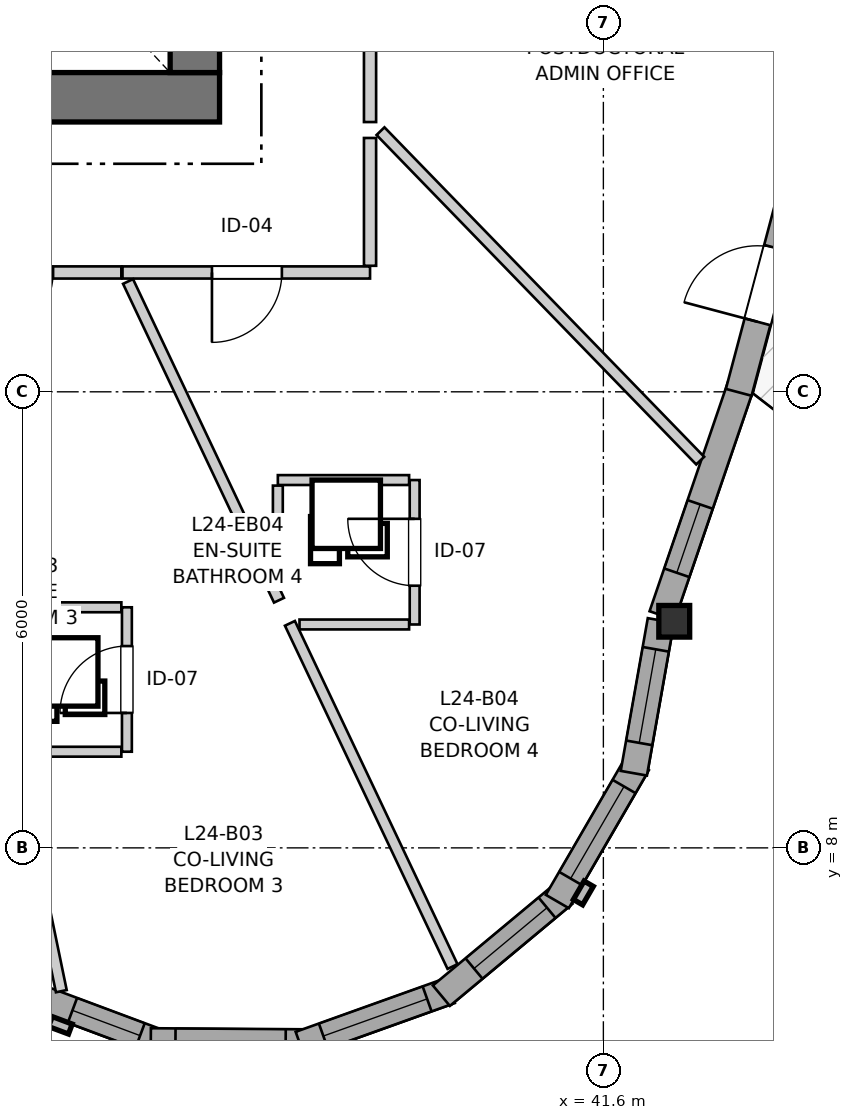
"""IFC4 building model, lengths in metres.
Left out: names, types, materials, properties, quantities, classifications, styles, units other than length and angle.
Written with IfcOpenShell. Run it as: python <this file> out.ifc"""

import sys

from ifc_helpers import new_model, si_unit, direction, frame, frame_2d, origin, origin_2d, place, context, subcontext, project, spatial, rectangle, i_section, extrude, source, transform, mapped, element, fill, save


model = new_model("IFC4")
c1 = context("Model", 3, precision=1e-05, world=origin(), true_north=direction((0.0, 1.0)))
c2 = subcontext(c1, "Body", "Model", "MODEL_VIEW")
j1 = project(units=[si_unit("LENGTHUNIT", "METRE"), si_unit("PLANEANGLEUNIT", "RADIAN")], contexts=[c1])
p1 = place(None, origin())
s1 = spatial("IfcSite", under=j1, at=p1, CompositionType="ELEMENT")
p2 = place(p1, origin())
s2 = spatial("IfcBuilding", under=s1, at=p2, CompositionType="ELEMENT")
p3 = place(p2, frame((0.0, 0.0, 83.2)))
s3 = spatial("IfcBuildingStorey", under=s2, at=p3, CompositionType="ELEMENT", Elevation=83.2)
p4 = place(p3, frame((24.15, 17.875, 0.0), z_axis=(0.0, 0.0, 1.0), x_axis=(1.0, 0.0, 0.0)))
e1 = element("IfcWall", 1, at=p4, inside=s3, PredefinedType="SHEAR", context=c2, shape_type="SweptSolid", body=[
    extrude(rectangle(XDim=12.4, YDim=0.65, at=frame_2d((6.2, 0.0))), origin(), (0.0, 0.0, 1.0), 2.935),
])
p5 = place(p3, frame((36.225, 18.2, 0.0), z_axis=(0.0, 0.0, 1.0), x_axis=(0.0, 1.0, 0.0)))
e2 = element("IfcWall", 2, at=p5, inside=s3, PredefinedType="SHEAR", context=c2, shape_type="SweptSolid", body=[
    extrude(rectangle(XDim=15.6, YDim=0.65, at=frame_2d((7.8, 0.0))), origin(), (0.0, 0.0, 1.0), 2.935),
])
p6 = place(p5, frame((4.25, 0.0, 0.0)))
e3 = element("IfcOpeningElement", 3, at=p6, cuts=e2, PredefinedType="OPENING", context=c2, shape_type="SweptSolid", body=[
    extrude(rectangle(XDim=1.1, YDim=2.15, at=frame_2d((0.55, 1.075))), frame((0.0, 0.335, 0.0), z_axis=(0.0, -1.0, 0.0), x_axis=(1.0, 0.0, 0.0)), (0.0, 0.0, 1.0), 0.67),
])
p7 = place(p5, frame((10.25, 0.0, 0.0)))
e4 = element("IfcOpeningElement", 4, at=p7, cuts=e2, PredefinedType="OPENING", context=c2, shape_type="SweptSolid", body=[
    extrude(rectangle(XDim=1.1, YDim=2.15, at=frame_2d((0.55, 1.075))), frame((0.0, 0.335, 0.0), z_axis=(0.0, -1.0, 0.0), x_axis=(1.0, 0.0, 0.0)), (0.0, 0.0, 1.0), 0.67),
])
m1 = source(origin(), c2, "Body", "SweptSolid", [
    extrude(i_section(OverallWidth=0.406, OverallDepth=0.416, WebThickness=0.027, FlangeThickness=0.044, FilletRadius=0.015, at=origin_2d()), origin(), (0.0, 0.0, 1.0), 2.935),
])
p8 = place(p3, frame((42.532, 10.981, 0.0), z_axis=(0.0, 0.0, 1.0), x_axis=(1.0, 0.0, 0.0)))
e5 = element("IfcColumn", 5, at=p8, inside=s3, PredefinedType="PILASTER", context=c2, shape_type="MappedRepresentation", body=[
    mapped(m1, transform((0.0, 0.0, 0.0), x_axis=(1.0, 0.0, 0.0), y_axis=(0.0, 1.0, 0.0), z_axis=(0.0, 0.0, 1.0), scale=1.0)),
])
p9 = place(p3, frame((34.059, 6.07, 0.0), z_axis=(0.0, 0.0, 1.0), x_axis=(0.936803747811, -0.349855310219, 0.0)))
e6 = element("IfcWall", 6, at=p9, inside=s3, PredefinedType="SOLIDWALL", context=c2, shape_type="SweptSolid", body=[
    extrude(rectangle(XDim=1.836, YDim=0.35, at=frame_2d((0.918, 0.0))), origin(), (0.0, 0.0, 1.0), 2.465),
])
p10 = place(p9, frame((0.593, 0.0, 0.82)))
e7 = element("IfcOpeningElement", 7, at=p10, cuts=e6, PredefinedType="OPENING", context=c2, shape_type="SweptSolid", body=[
    extrude(rectangle(XDim=0.95, YDim=1.35, at=frame_2d((0.475, 0.675))), frame((0.0, 0.185, 0.0), z_axis=(0.0, -1.0, 0.0), x_axis=(1.0, 0.0, 0.0)), (0.0, 0.0, 1.0), 0.37),
])
p11 = place(p3, frame((35.646, 5.452, 0.0), z_axis=(0.0, 0.0, 1.0), x_axis=(0.999976451414, -0.006862697526, 0.0)))
e8 = element("IfcWall", 8, at=p11, inside=s3, PredefinedType="SOLIDWALL", context=c2, shape_type="SweptSolid", body=[
    extrude(rectangle(XDim=2.099, YDim=0.35, at=frame_2d((1.049, 0.0))), origin(), (0.0, 0.0, 1.0), 2.465),
])
p12 = place(p11, frame((0.324, 0.0, 0.82)))
e9 = element("IfcOpeningElement", 9, at=p12, cuts=e8, PredefinedType="OPENING", context=c2, shape_type="SweptSolid", body=[
    extrude(rectangle(XDim=1.45, YDim=1.25, at=frame_2d((0.725, 0.625))), frame((0.0, 0.185, 0.0), z_axis=(0.0, -1.0, 0.0), x_axis=(1.0, 0.0, 0.0)), (0.0, 0.0, 1.0), 0.37),
])
p13 = place(p3, frame((37.61, 5.415, 0.0), z_axis=(0.0, 0.0, 1.0), x_axis=(0.941473186867, 0.33708787936, 0.0)))
e10 = element("IfcWall", 10, at=p13, inside=s3, PredefinedType="SOLIDWALL", context=c2, shape_type="SweptSolid", body=[
    extrude(rectangle(XDim=2.099, YDim=0.35, at=frame_2d((1.049, 0.0))), origin(), (0.0, 0.0, 1.0), 2.465),
])
p14 = place(p13, frame((0.324, 0.0, 0.82)))
e11 = element("IfcOpeningElement", 11, at=p14, cuts=e10, PredefinedType="OPENING", context=c2, shape_type="SweptSolid", body=[
    extrude(rectangle(XDim=1.45, YDim=1.25, at=frame_2d((0.725, 0.625))), frame((0.0, 0.185, 0.0), z_axis=(0.0, -1.0, 0.0), x_axis=(1.0, 0.0, 0.0)), (0.0, 0.0, 1.0), 0.37),
])
p15 = place(p3, frame((39.469, 6.055, 0.0), z_axis=(0.0, 0.0, 1.0), x_axis=(0.768497696041, 0.639852554249, 0.0)))
e12 = element("IfcWall", 12, at=p15, inside=s3, PredefinedType="SOLIDWALL", context=c2, shape_type="SweptSolid", body=[
    extrude(rectangle(XDim=2.099, YDim=0.35, at=frame_2d((1.049, 0.0))), origin(), (0.0, 0.0, 1.0), 2.465),
])
p16 = place(p15, frame((0.559, 0.0, 0.82)))
e13 = element("IfcOpeningElement", 13, at=p16, cuts=e12, PredefinedType="OPENING", context=c2, shape_type="SweptSolid", body=[
    extrude(rectangle(XDim=1.25, YDim=1.35, at=frame_2d((0.625, 0.675))), frame((0.0, 0.185, 0.0), z_axis=(0.0, -1.0, 0.0), x_axis=(1.0, 0.0, 0.0)), (0.0, 0.0, 1.0), 0.37),
])
p17 = place(p3, frame((40.994, 7.294, 0.0), z_axis=(0.0, 0.0, 1.0), x_axis=(0.501902596059, 0.864924149315, 0.0)))
e14 = element("IfcWall", 14, at=p17, inside=s3, PredefinedType="SOLIDWALL", context=c2, shape_type="SweptSolid", body=[
    extrude(rectangle(XDim=2.099, YDim=0.35, at=frame_2d((1.049, 0.0))), origin(), (0.0, 0.0, 1.0), 2.465),
])
p18 = place(p17, frame((0.35, 0.0, 0.82)))
e15 = element("IfcOpeningElement", 15, at=p18, cuts=e14, PredefinedType="OPENING", context=c2, shape_type="SweptSolid", body=[
    extrude(rectangle(XDim=1.4, YDim=1.35, at=frame_2d((0.7, 0.675))), frame((0.0, 0.185, 0.0), z_axis=(0.0, -1.0, 0.0), x_axis=(1.0, 0.0, 0.0)), (0.0, 0.0, 1.0), 0.37),
])
p19 = place(p3, frame((42.001, 8.982, 0.0), z_axis=(0.0, 0.0, 1.0), x_axis=(0.174419977077, 0.984671352075, 0.0)))
e16 = element("IfcWall", 16, at=p19, inside=s3, PredefinedType="SOLIDWALL", context=c2, shape_type="SweptSolid", body=[
    extrude(rectangle(XDim=2.041, YDim=0.35, at=frame_2d((1.021, 0.0))), origin(), (0.0, 0.0, 1.0), 2.465),
])
p20 = place(p19, frame((0.406, 0.0, 0.82)))
e17 = element("IfcOpeningElement", 17, at=p20, cuts=e16, PredefinedType="OPENING", context=c2, shape_type="SweptSolid", body=[
    extrude(rectangle(XDim=1.25, YDim=1.35, at=frame_2d((0.625, 0.675))), frame((0.0, 0.185, 0.0), z_axis=(0.0, -1.0, 0.0), x_axis=(1.0, 0.0, 0.0)), (0.0, 0.0, 1.0), 0.37),
])
p21 = place(p3, frame((42.373, 11.057, 0.0), z_axis=(0.0, 0.0, 1.0), x_axis=(0.323628226775, 0.946184321808, 0.0)))
e18 = element("IfcWall", 18, at=p21, inside=s3, PredefinedType="SOLIDWALL", context=c2, shape_type="SweptSolid", body=[
    extrude(rectangle(XDim=3.193, YDim=0.35, at=frame_2d((1.596, 0.0))), origin(), (0.0, 0.0, 1.0), 2.465),
])
p22 = place(p21, frame((0.595, 0.0, 0.82)))
e19 = element("IfcOpeningElement", 19, at=p22, cuts=e18, PredefinedType="OPENING", context=c2, shape_type="SweptSolid", body=[
    extrude(rectangle(XDim=0.95, YDim=1.35, at=frame_2d((0.475, 0.675))), frame((0.0, 0.185, 0.0), z_axis=(0.0, -1.0, 0.0), x_axis=(1.0, 0.0, 0.0)), (0.0, 0.0, 1.0), 0.37),
])
p23 = place(p3, frame((43.381, 13.993, 0.0), z_axis=(0.0, 0.0, 1.0), x_axis=(0.257079998736, 0.966390125286, 0.0)))
e20 = element("IfcWall", 20, at=p23, inside=s3, PredefinedType="SOLIDWALL", context=c2, shape_type="SweptSolid", body=[
    extrude(rectangle(XDim=2.921, YDim=0.35, at=frame_2d((1.46, 0.0))), origin(), (0.0, 0.0, 1.0), 2.465),
])
p24 = place(p23, frame((0.961, 0.0, 0.0)))
e21 = element("IfcOpeningElement", 21, at=p24, cuts=e20, PredefinedType="OPENING", context=c2, shape_type="SweptSolid", body=[
    extrude(rectangle(XDim=1.0, YDim=2.1, at=frame_2d((0.5, 1.05))), frame((0.0, 0.185, 0.0), z_axis=(0.0, -1.0, 0.0), x_axis=(1.0, 0.0, 0.0)), (0.0, 0.0, 1.0), 0.37),
])
p25 = place(p3, frame((38.53, 23.392, 0.0), z_axis=(0.0, 0.0, 1.0), x_axis=(0.0, -1.0, 0.0)))
e22 = element("IfcWall", 22, at=p25, inside=s3, PredefinedType="PARTITIONING", context=c2, shape_type="SweptSolid", body=[
    extrude(rectangle(XDim=5.843, YDim=0.16, at=frame_2d((2.921, 0.0))), origin(), (0.0, 0.0, 1.0), 2.935),
])
p26 = place(p25, frame((2.438, 0.0, 0.0)))
e23 = element("IfcOpeningElement", 23, at=p26, cuts=e22, PredefinedType="OPENING", context=c2, shape_type="SweptSolid", body=[
    extrude(rectangle(XDim=0.96, YDim=2.1, at=frame_2d((0.48, 1.05))), frame((0.0, 0.09, 0.0), z_axis=(0.0, -1.0, 0.0), x_axis=(1.0, 0.0, 0.0)), (0.0, 0.0, 1.0), 0.18),
])
p27 = place(p3, frame((38.53, 15.57, 0.0), z_axis=(0.0, 0.0, 1.0), x_axis=(-1.0, 0.0, 0.0)))
e24 = element("IfcWall", 24, at=p27, inside=s3, PredefinedType="PARTITIONING", context=c2, shape_type="SweptSolid", body=[
    extrude(rectangle(XDim=3.257, YDim=0.16, at=frame_2d((1.628, 0.0))), origin(), (0.0, 0.0, 1.0), 2.935),
])
p28 = place(p27, frame((1.16, 0.0, 0.0)))
e25 = element("IfcOpeningElement", 25, at=p28, cuts=e24, PredefinedType="OPENING", context=c2, shape_type="SweptSolid", body=[
    extrude(rectangle(XDim=0.92, YDim=2.1, at=frame_2d((0.46, 1.05))), frame((0.0, 0.09, 0.0), z_axis=(0.0, -1.0, 0.0), x_axis=(1.0, 0.0, 0.0)), (0.0, 0.0, 1.0), 0.18),
])
p29 = place(p3, frame((35.258, 15.57, 0.0), z_axis=(0.0, 0.0, 1.0), x_axis=(-1.0, 0.0, 0.0)))
e26 = element("IfcWall", 26, at=p29, inside=s3, PredefinedType="PARTITIONING", context=c2, shape_type="SweptSolid", body=[
    extrude(rectangle(XDim=2.718, YDim=0.16, at=frame_2d((1.359, 0.0))), origin(), (0.0, 0.0, 1.0), 2.935),
])
p30 = place(p29, frame((0.898, 0.0, 0.0)))
e27 = element("IfcOpeningElement", 27, at=p30, cuts=e26, PredefinedType="OPENING", context=c2, shape_type="SweptSolid", body=[
    extrude(rectangle(XDim=0.92, YDim=2.1, at=frame_2d((0.46, 1.05))), frame((0.0, 0.09, 0.0), z_axis=(0.0, -1.0, 0.0), x_axis=(1.0, 0.0, 0.0)), (0.0, 0.0, 1.0), 0.18),
])
p31 = place(p3, frame((39.117, 10.939, 0.0), z_axis=(0.0, 0.0, 1.0), x_axis=(0.0, 1.0, 0.0)))
e28 = element("IfcWall", 28, at=p31, inside=s3, PredefinedType="PARTITIONING", context=c2, shape_type="SweptSolid", body=[
    extrude(rectangle(XDim=1.9, YDim=0.13, at=frame_2d((0.95, 0.0))), origin(), (0.0, 0.0, 1.0), 2.935),
])
p32 = place(p31, frame((0.51, 0.0, 0.0)))
e29 = element("IfcOpeningElement", 29, at=p32, cuts=e28, PredefinedType="OPENING", context=c2, shape_type="SweptSolid", body=[
    extrude(rectangle(XDim=0.88, YDim=2.05, at=frame_2d((0.44, 1.025))), frame((0.0, 0.075, 0.0), z_axis=(0.0, -1.0, 0.0), x_axis=(1.0, 0.0, 0.0)), (0.0, 0.0, 1.0), 0.15),
])
p33 = place(p3, frame((35.331, 9.265, 0.0), z_axis=(0.0, 0.0, 1.0), x_axis=(0.0, 1.0, 0.0)))
e30 = element("IfcWall", 30, at=p33, inside=s3, PredefinedType="PARTITIONING", context=c2, shape_type="SweptSolid", body=[
    extrude(rectangle(XDim=1.9, YDim=0.13, at=frame_2d((0.95, 0.0))), origin(), (0.0, 0.0, 1.0), 2.935),
])
p34 = place(p33, frame((0.51, 0.0, 0.0)))
e31 = element("IfcOpeningElement", 31, at=p34, cuts=e30, PredefinedType="OPENING", context=c2, shape_type="SweptSolid", body=[
    extrude(rectangle(XDim=0.88, YDim=2.05, at=frame_2d((0.44, 1.025))), frame((0.0, 0.075, 0.0), z_axis=(0.0, -1.0, 0.0), x_axis=(1.0, 0.0, 0.0)), (0.0, 0.0, 1.0), 0.15),
])
p35 = place(p3, frame((38.667, 17.429, 0.0), z_axis=(0.0, 0.0, 1.0), x_axis=(0.696417222112, -0.717637131666, 0.0)))
e32 = element("IfcWall", 32, at=p35, inside=s3, PredefinedType="PARTITIONING", context=c2, shape_type="SweptSolid", body=[
    extrude(rectangle(XDim=6.04, YDim=0.145, at=frame_2d((3.02, 0.0))), origin(), (0.0, 0.0, 1.0), 2.935),
])
p36 = place(p3, frame((37.476, 10.954, 0.0), z_axis=(0.0, 0.0, 1.0), x_axis=(0.428094746621, -0.903733859007, 0.0)))
e33 = element("IfcWall", 33, at=p36, inside=s3, PredefinedType="PARTITIONING", context=c2, shape_type="SweptSolid", body=[
    extrude(rectangle(XDim=4.996, YDim=0.145, at=frame_2d((2.498, 0.0))), origin(), (0.0, 0.0, 1.0), 2.935),
])
p37 = place(p3, frame((35.346, 15.452, 0.0), z_axis=(0.0, 0.0, 1.0), x_axis=(0.428023015228, -0.903767834366, 0.0)))
e34 = element("IfcWall", 34, at=p37, inside=s3, PredefinedType="PARTITIONING", context=c2, shape_type="SweptSolid", body=[
    extrude(rectangle(XDim=4.64, YDim=0.145, at=frame_2d((2.32, 0.0))), origin(), (0.0, 0.0, 1.0), 2.935),
])
p38 = place(p3, frame((33.813, 9.28, 0.0), z_axis=(0.0, 0.0, 1.0), x_axis=(0.202648062782, -0.979251633979, 0.0)))
e35 = element("IfcWall", 35, at=p38, inside=s3, PredefinedType="PARTITIONING", context=c2, shape_type="SweptSolid", body=[
    extrude(rectangle(XDim=3.232, YDim=0.145, at=frame_2d((1.616, 0.0))), origin(), (0.0, 0.0, 1.0), 2.935),
])
p39 = place(p3, frame((38.53, 15.658, 0.0), z_axis=(0.0, 0.0, 1.0), x_axis=(0.0, 1.0, 0.0)))
e36 = element("IfcWall", 36, at=p39, inside=s3, PredefinedType="PARTITIONING", context=c2, shape_type="SweptSolid", body=[
    extrude(rectangle(XDim=1.682, YDim=0.16, at=frame_2d((0.841, 0.0))), origin(), (0.0, 0.0, 1.0), 2.935),
])
p40 = place(p3, frame((33.626, 11.165, 0.0), z_axis=(0.0, 0.0, 1.0), x_axis=(1.0, 0.0, 0.0)))
e37 = element("IfcWall", 37, at=p40, inside=s3, PredefinedType="PARTITIONING", context=c2, shape_type="SweptSolid", body=[
    extrude(rectangle(XDim=1.632, YDim=0.13, at=frame_2d((0.816, 0.0))), origin(), (0.0, 0.0, 1.0), 2.935),
])
p41 = place(p3, frame((37.317, 12.839, 0.0), z_axis=(0.0, 0.0, 1.0), x_axis=(1.0, 0.0, 0.0)))
e38 = element("IfcWall", 38, at=p41, inside=s3, PredefinedType="PARTITIONING", context=c2, shape_type="SweptSolid", body=[
    extrude(rectangle(XDim=1.727, YDim=0.13, at=frame_2d((0.864, 0.0))), origin(), (0.0, 0.0, 1.0), 2.935),
])
p42 = place(p3, frame((37.602, 10.939, 0.0), z_axis=(0.0, 0.0, 1.0), x_axis=(1.0, 0.0, 0.0)))
e39 = element("IfcWall", 39, at=p42, inside=s3, PredefinedType="PARTITIONING", context=c2, shape_type="SweptSolid", body=[
    extrude(rectangle(XDim=1.442, YDim=0.13, at=frame_2d((0.721, 0.0))), origin(), (0.0, 0.0, 1.0), 2.935),
])
p43 = place(p3, frame((37.317, 11.53, 0.0), z_axis=(0.0, 0.0, 1.0), x_axis=(0.0, 1.0, 0.0)))
e40 = element("IfcWall", 40, at=p43, inside=s3, PredefinedType="PARTITIONING", context=c2, shape_type="SweptSolid", body=[
    extrude(rectangle(XDim=1.236, YDim=0.13, at=frame_2d((0.618, 0.0))), origin(), (0.0, 0.0, 1.0), 2.935),
])
p44 = place(p3, frame((33.912, 9.265, 0.0), z_axis=(0.0, 0.0, 1.0), x_axis=(1.0, 0.0, 0.0)))
e41 = element("IfcWall", 41, at=p44, inside=s3, PredefinedType="PARTITIONING", context=c2, shape_type="SweptSolid", body=[
    extrude(rectangle(XDim=1.346, YDim=0.13, at=frame_2d((0.673, 0.0))), origin(), (0.0, 0.0, 1.0), 2.935),
])
m2 = source(origin(), c2, "Body", "SweptSolid", [
    extrude(rectangle(XDim=0.95, YDim=1.35, at=frame_2d((0.475, 0.675))), frame((0.0, 0.03, 0.0), z_axis=(0.0, -1.0, 0.0), x_axis=(1.0, 0.0, 0.0)), (0.0, 0.0, 1.0), 0.06),
])
p45 = place(p10, origin())
e42 = element("IfcWindow", 42, at=p45, inside=s3, PartitioningType="SINGLE_PANEL", PredefinedType="WINDOW", context=c2, shape_type="MappedRepresentation", body=[
    mapped(m2, transform((0.0, 0.0, 0.0), x_axis=(1.0, 0.0, 0.0), y_axis=(0.0, 1.0, 0.0), z_axis=(0.0, 0.0, 1.0), scale=1.0)),
])
fill(e7, e42)
m3 = source(origin(), c2, "Body", "SweptSolid", [
    extrude(rectangle(XDim=1.45, YDim=1.25, at=frame_2d((0.725, 0.625))), frame((0.0, 0.03, 0.0), z_axis=(0.0, -1.0, 0.0), x_axis=(1.0, 0.0, 0.0)), (0.0, 0.0, 1.0), 0.06),
])
p46 = place(p12, origin())
e43 = element("IfcWindow", 43, at=p46, inside=s3, PartitioningType="SINGLE_PANEL", PredefinedType="WINDOW", context=c2, shape_type="MappedRepresentation", body=[
    mapped(m3, transform((0.0, 0.0, 0.0), x_axis=(1.0, 0.0, 0.0), y_axis=(0.0, 1.0, 0.0), z_axis=(0.0, 0.0, 1.0), scale=1.0)),
])
fill(e9, e43)
p47 = place(p14, origin())
e44 = element("IfcWindow", 44, at=p47, inside=s3, PartitioningType="SINGLE_PANEL", PredefinedType="WINDOW", context=c2, shape_type="MappedRepresentation", body=[
    mapped(m3, transform((0.0, 0.0, 0.0), x_axis=(1.0, 0.0, 0.0), y_axis=(0.0, 1.0, 0.0), z_axis=(0.0, 0.0, 1.0), scale=1.0)),
])
fill(e11, e44)
m4 = source(origin(), c2, "Body", "SweptSolid", [
    extrude(rectangle(XDim=1.25, YDim=1.35, at=frame_2d((0.625, 0.675))), frame((0.0, 0.03, 0.0), z_axis=(0.0, -1.0, 0.0), x_axis=(1.0, 0.0, 0.0)), (0.0, 0.0, 1.0), 0.06),
])
p48 = place(p16, origin())
e45 = element("IfcWindow", 45, at=p48, inside=s3, PartitioningType="SINGLE_PANEL", PredefinedType="WINDOW", context=c2, shape_type="MappedRepresentation", body=[
    mapped(m4, transform((0.0, 0.0, 0.0), x_axis=(1.0, 0.0, 0.0), y_axis=(0.0, 1.0, 0.0), z_axis=(0.0, 0.0, 1.0), scale=1.0)),
])
fill(e13, e45)
m5 = source(origin(), c2, "Body", "SweptSolid", [
    extrude(rectangle(XDim=1.4, YDim=1.35, at=frame_2d((0.7, 0.675))), frame((0.0, 0.03, 0.0), z_axis=(0.0, -1.0, 0.0), x_axis=(1.0, 0.0, 0.0)), (0.0, 0.0, 1.0), 0.06),
])
p49 = place(p18, origin())
e46 = element("IfcWindow", 46, at=p49, inside=s3, PartitioningType="SINGLE_PANEL", PredefinedType="WINDOW", context=c2, shape_type="MappedRepresentation", body=[
    mapped(m5, transform((0.0, 0.0, 0.0), x_axis=(1.0, 0.0, 0.0), y_axis=(0.0, 1.0, 0.0), z_axis=(0.0, 0.0, 1.0), scale=1.0)),
])
fill(e15, e46)
p50 = place(p20, origin())
e47 = element("IfcWindow", 47, at=p50, inside=s3, PartitioningType="SINGLE_PANEL", PredefinedType="WINDOW", context=c2, shape_type="MappedRepresentation", body=[
    mapped(m4, transform((0.0, 0.0, 0.0), x_axis=(1.0, 0.0, 0.0), y_axis=(0.0, 1.0, 0.0), z_axis=(0.0, 0.0, 1.0), scale=1.0)),
])
fill(e17, e47)
p51 = place(p22, origin())
e48 = element("IfcWindow", 48, at=p51, inside=s3, PartitioningType="SINGLE_PANEL", PredefinedType="WINDOW", context=c2, shape_type="MappedRepresentation", body=[
    mapped(m2, transform((0.0, 0.0, 0.0), x_axis=(1.0, 0.0, 0.0), y_axis=(0.0, 1.0, 0.0), z_axis=(0.0, 0.0, 1.0), scale=1.0)),
])
fill(e19, e48)
m6 = source(origin(), c2, "Body", "SweptSolid", [
    extrude(rectangle(XDim=1.0, YDim=2.1, at=frame_2d((0.5, 1.05))), frame((0.0, 0.025, 0.0), z_axis=(0.0, -1.0, 0.0), x_axis=(1.0, 0.0, 0.0)), (0.0, 0.0, 1.0), 0.05),
])
p52 = place(p24, origin())
e49 = element("IfcDoor", 49, at=p52, inside=s3, OperationType="SINGLE_SWING_LEFT", PredefinedType="DOOR", context=c2, shape_type="MappedRepresentation", body=[
    mapped(m6, transform((0.0, 0.0, 0.0), x_axis=(1.0, 0.0, 0.0), y_axis=(0.0, 1.0, 0.0), z_axis=(0.0, 0.0, 1.0), scale=1.0)),
])
fill(e21, e49)
m7 = source(origin(), c2, "Body", "SweptSolid", [
    extrude(rectangle(XDim=0.92, YDim=2.1, at=frame_2d((0.46, 1.05))), frame((0.0, 0.025, 0.0), z_axis=(0.0, -1.0, 0.0), x_axis=(1.0, 0.0, 0.0)), (0.0, 0.0, 1.0), 0.05),
])
p53 = place(p28, origin())
e50 = element("IfcDoor", 50, at=p53, inside=s3, OperationType="SINGLE_SWING_RIGHT", PredefinedType="DOOR", context=c2, shape_type="MappedRepresentation", body=[
    mapped(m7, transform((0.0, 0.0, 0.0), x_axis=(1.0, 0.0, 0.0), y_axis=(0.0, 1.0, 0.0), z_axis=(0.0, 0.0, 1.0), scale=1.0)),
])
fill(e25, e50)
p54 = place(p30, origin())
e51 = element("IfcDoor", 51, at=p54, inside=s3, OperationType="SINGLE_SWING_RIGHT", PredefinedType="DOOR", context=c2, shape_type="MappedRepresentation", body=[
    mapped(m7, transform((0.0, 0.0, 0.0), x_axis=(1.0, 0.0, 0.0), y_axis=(0.0, 1.0, 0.0), z_axis=(0.0, 0.0, 1.0), scale=1.0)),
])
fill(e27, e51)
m8 = source(origin(), c2, "Body", "SweptSolid", [
    extrude(rectangle(XDim=0.88, YDim=2.05, at=frame_2d((0.44, 1.025))), frame((0.0, 0.025, 0.0), z_axis=(0.0, -1.0, 0.0), x_axis=(1.0, 0.0, 0.0)), (0.0, 0.0, 1.0), 0.05),
])
p55 = place(p32, origin())
e52 = element("IfcDoor", 52, at=p55, inside=s3, OperationType="SINGLE_SWING_RIGHT", PredefinedType="DOOR", context=c2, shape_type="MappedRepresentation", body=[
    mapped(m8, transform((0.0, 0.0, 0.0), x_axis=(1.0, 0.0, 0.0), y_axis=(0.0, 1.0, 0.0), z_axis=(0.0, 0.0, 1.0), scale=1.0)),
])
fill(e29, e52)
p56 = place(p34, origin())
e53 = element("IfcDoor", 53, at=p56, inside=s3, OperationType="SINGLE_SWING_LEFT", PredefinedType="DOOR", context=c2, shape_type="MappedRepresentation", body=[
    mapped(m8, transform((0.0, 0.0, 0.0), x_axis=(1.0, 0.0, 0.0), y_axis=(0.0, 1.0, 0.0), z_axis=(0.0, 0.0, 1.0), scale=1.0)),
])
fill(e31, e53)
save(model, sys.argv[1])
